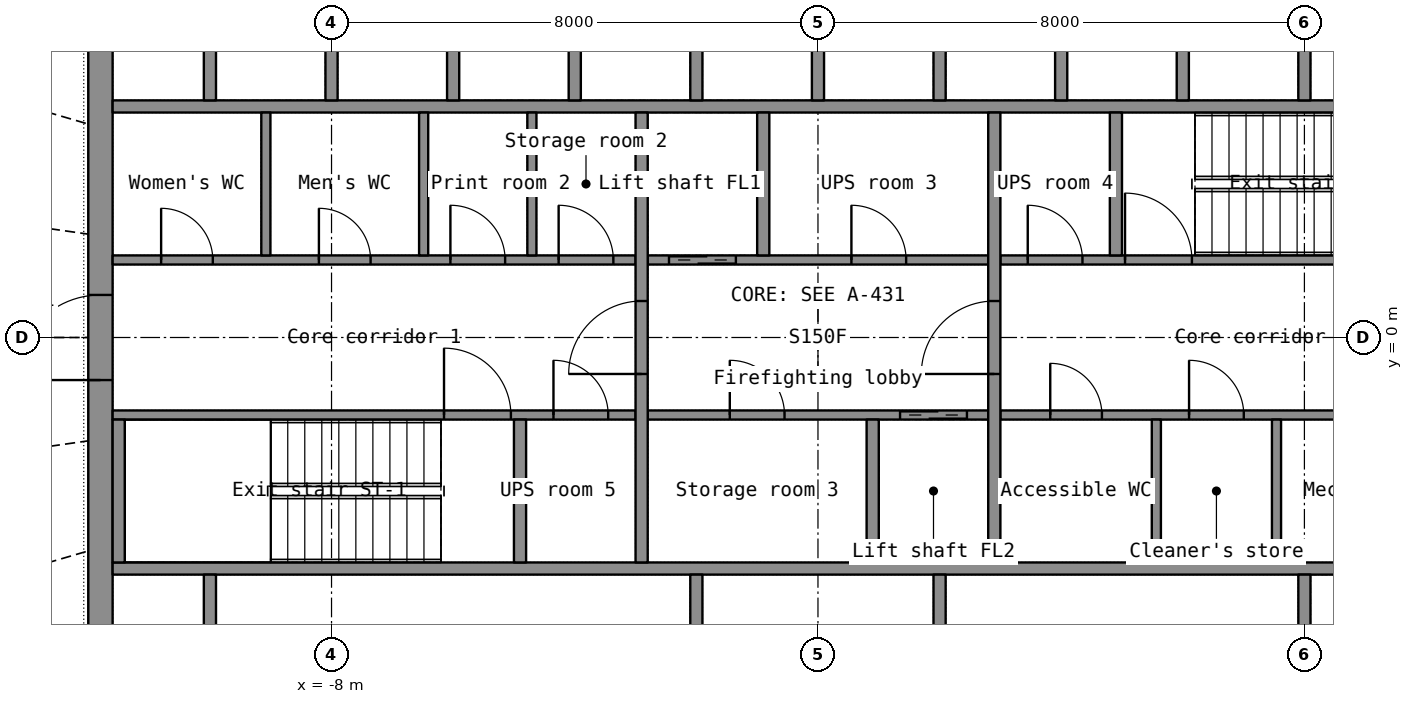
"""IFC4 building model, lengths in metres.
Left out: names, types, materials, properties, quantities, classifications, styles, units other than length and angle.
Written with IfcOpenShell. Run it as: python <this file> out.ifc"""

import sys

from ifc_helpers import new_model, si_unit, direction, frame, frame_2d, origin, place, context, subcontext, project, spatial, rectangle, extrude, element, fill, save


model = new_model("IFC4")
c1 = context("Model", 3, precision=1e-05, world=origin(), true_north=direction((0.0, 1.0)))
c2 = subcontext(c1, "Body", "Model", "MODEL_VIEW")
j1 = project(units=[si_unit("LENGTHUNIT", "METRE"), si_unit("PLANEANGLEUNIT", "RADIAN")], contexts=[c1])
p1 = place(None, origin())
s1 = spatial("IfcSite", under=j1, at=p1, CompositionType="ELEMENT")
p2 = place(p1, origin())
s2 = spatial("IfcBuilding", under=s1, at=p2, CompositionType="ELEMENT")
p3 = place(p2, frame((0.0, 0.0, 246.7)))
s3 = spatial("IfcBuildingStorey", under=s2, at=p3, CompositionType="ELEMENT", Elevation=246.7)
p4 = place(p3, frame((-11.8, -7.2, 0.0), z_axis=(0.0, 0.0, 1.0), x_axis=(0.0, 1.0, 0.0)))
e1 = element("IfcWall", 1, at=p4, inside=s3, PredefinedType="SHEAR", context=c2, shape_type="SweptSolid", body=[
    extrude(rectangle(XDim=14.4, YDim=0.4, at=frame_2d((7.2, 0.0))), origin(), (0.0, 0.0, 1.0), 3.3),
])
p5 = place(p4, frame((6.5, 0.0, 0.0)))
e2 = element("IfcOpeningElement", 2, at=p5, cuts=e1, PredefinedType="OPENING", context=c2, shape_type="SweptSolid", body=[
    extrude(rectangle(XDim=1.4, YDim=2.2, at=frame_2d((0.7, 1.1))), frame((0.0, 0.21, 0.0), z_axis=(0.0, -1.0, 0.0), x_axis=(1.0, 0.0, 0.0)), (0.0, 0.0, 1.0), 0.42),
])
for number, where, z_axis, x_axis in (
    (3, (-11.6, -3.8, 0.0), (0.0, 0.0, 1.0), (1.0, 0.0, 0.0)),
    (4, (-11.6, 3.8, 0.0), (0.0, 0.0, 1.0), (1.0, 0.0, 0.0)),
):
    element("IfcWall", number, at=place(p3, frame(where, z_axis=z_axis, x_axis=x_axis)), inside=s3, PredefinedType="SHEAR", context=c2, shape_type="SweptSolid", body=[
        extrude(rectangle(XDim=23.2, YDim=0.2, at=frame_2d((11.6, 0.0))), origin(), (0.0, 0.0, 1.0), 3.3),
    ])
for number, where, z_axis, x_axis in (
    (5, (-10.0, -6.8, 0.0), (0.0, 0.0, 1.0), (0.0, 1.0, 0.0)),
    (6, (8.0, -6.8, 0.0), (0.0, 0.0, 1.0), (0.0, 1.0, 0.0)),
):
    element("IfcWall", number, at=place(p3, frame(where, z_axis=z_axis, x_axis=x_axis)), inside=s3, PredefinedType="SHEAR", context=c2, shape_type="SweptSolid", body=[
        extrude(rectangle(XDim=2.9, YDim=0.2, at=frame_2d((1.45, 0.0))), origin(), (0.0, 0.0, 1.0), 3.3),
    ])
for number, where, z_axis, x_axis in (
    (7, (-2.0, -6.8, 0.0), (0.0, 0.0, 1.0), (0.0, 1.0, 0.0)),
    (8, (2.0, -6.8, 0.0), (0.0, 0.0, 1.0), (0.0, 1.0, 0.0)),
):
    element("IfcWall", number, at=place(p3, frame(where, z_axis=z_axis, x_axis=x_axis)), inside=s3, PredefinedType="PARTITIONING", context=c2, shape_type="SweptSolid", body=[
        extrude(rectangle(XDim=2.9, YDim=0.2, at=frame_2d((1.45, 0.0))), origin(), (0.0, 0.0, 1.0), 3.3),
    ])
for number, where, z_axis, x_axis in (
    (9, (-10.0, 3.9, 0.0), (0.0, 0.0, 1.0), (0.0, 1.0, 0.0)),
    (10, (-8.0, 3.9, 0.0), (0.0, 0.0, 1.0), (0.0, 1.0, 0.0)),
    (11, (-6.0, 3.9, 0.0), (0.0, 0.0, 1.0), (0.0, 1.0, 0.0)),
    (12, (-4.0, 3.9, 0.0), (0.0, 0.0, 1.0), (0.0, 1.0, 0.0)),
    (13, (-2.0, 3.9, 0.0), (0.0, 0.0, 1.0), (0.0, 1.0, 0.0)),
    (14, (0.0, 3.9, 0.0), (0.0, 0.0, 1.0), (0.0, 1.0, 0.0)),
    (15, (2.0, 3.9, 0.0), (0.0, 0.0, 1.0), (0.0, 1.0, 0.0)),
    (16, (4.0, 3.9, 0.0), (0.0, 0.0, 1.0), (0.0, 1.0, 0.0)),
    (17, (6.0, 3.9, 0.0), (0.0, 0.0, 1.0), (0.0, 1.0, 0.0)),
    (18, (8.0, 3.9, 0.0), (0.0, 0.0, 1.0), (0.0, 1.0, 0.0)),
):
    element("IfcWall", number, at=place(p3, frame(where, z_axis=z_axis, x_axis=x_axis)), inside=s3, PredefinedType="SHEAR", context=c2, shape_type="SweptSolid", body=[
        extrude(rectangle(XDim=2.9, YDim=0.2, at=frame_2d((1.45, 0.0))), origin(), (0.0, 0.0, 1.0), 3.3),
    ])
p6 = place(p3, frame((-11.6, -1.275, 0.0), z_axis=(0.0, 0.0, 1.0), x_axis=(1.0, 0.0, 0.0)))
e19 = element("IfcWall", 19, at=p6, inside=s3, PredefinedType="SHEAR", context=c2, shape_type="SweptSolid", body=[
    extrude(rectangle(XDim=8.6, YDim=0.15, at=frame_2d((4.3, 0.0))), origin(), (0.0, 0.0, 1.0), 3.3),
])
p7 = place(p6, frame((5.45, 0.0, 0.0)))
e20 = element("IfcOpeningElement", 20, at=p7, cuts=e19, PredefinedType="OPENING", context=c2, shape_type="SweptSolid", body=[
    extrude(rectangle(XDim=1.1, YDim=2.15, at=frame_2d((0.55, 1.075))), frame((0.0, 0.085, 0.0), z_axis=(0.0, -1.0, 0.0), x_axis=(1.0, 0.0, 0.0)), (0.0, 0.0, 1.0), 0.17),
])
p8 = place(p6, frame((7.25, 0.0, 0.0)))
e21 = element("IfcOpeningElement", 21, at=p8, cuts=e19, PredefinedType="OPENING", context=c2, shape_type="SweptSolid", body=[
    extrude(rectangle(XDim=0.9, YDim=2.1, at=frame_2d((0.45, 1.05))), frame((0.0, 0.085, 0.0), z_axis=(0.0, -1.0, 0.0), x_axis=(1.0, 0.0, 0.0)), (0.0, 0.0, 1.0), 0.17),
])
p9 = place(p3, frame((-2.8, -1.275, 0.0), z_axis=(0.0, 0.0, 1.0), x_axis=(1.0, 0.0, 0.0)))
e22 = element("IfcWall", 22, at=p9, inside=s3, PredefinedType="SHEAR", context=c2, shape_type="SweptSolid", body=[
    extrude(rectangle(XDim=5.6, YDim=0.15, at=frame_2d((2.8, 0.0))), origin(), (0.0, 0.0, 1.0), 3.3),
])
p10 = place(p9, frame((4.15, 0.0, 0.0)))
e23 = element("IfcOpeningElement", 23, at=p10, cuts=e22, PredefinedType="OPENING", context=c2, shape_type="SweptSolid", body=[
    extrude(rectangle(XDim=1.1, YDim=2.2, at=frame_2d((0.55, 1.1))), frame((0.0, 0.085, 0.0), z_axis=(0.0, -1.0, 0.0), x_axis=(1.0, 0.0, 0.0)), (0.0, 0.0, 1.0), 0.17),
])
p11 = place(p9, frame((1.35, 0.0, 0.0)))
e24 = element("IfcOpeningElement", 24, at=p11, cuts=e22, PredefinedType="OPENING", context=c2, shape_type="SweptSolid", body=[
    extrude(rectangle(XDim=0.9, YDim=2.1, at=frame_2d((0.45, 1.05))), frame((0.0, 0.085, 0.0), z_axis=(0.0, -1.0, 0.0), x_axis=(1.0, 0.0, 0.0)), (0.0, 0.0, 1.0), 0.17),
])
p12 = place(p3, frame((3.0, -1.275, 0.0), z_axis=(0.0, 0.0, 1.0), x_axis=(1.0, 0.0, 0.0)))
e25 = element("IfcWall", 25, at=p12, inside=s3, PredefinedType="PARTITIONING", context=c2, shape_type="SweptSolid", body=[
    extrude(rectangle(XDim=8.6, YDim=0.15, at=frame_2d((4.3, 0.0))), origin(), (0.0, 0.0, 1.0), 3.3),
])
p13 = place(p12, frame((0.82, 0.0, 0.0)))
e26 = element("IfcOpeningElement", 26, at=p13, cuts=e25, PredefinedType="OPENING", context=c2, shape_type="SweptSolid", body=[
    extrude(rectangle(XDim=0.85, YDim=2.1, at=frame_2d((0.425, 1.05))), frame((0.0, 0.085, 0.0), z_axis=(0.0, -1.0, 0.0), x_axis=(1.0, 0.0, 0.0)), (0.0, 0.0, 1.0), 0.17),
])
p14 = place(p12, frame((3.103, 0.0, 0.0)))
e27 = element("IfcOpeningElement", 27, at=p14, cuts=e25, PredefinedType="OPENING", context=c2, shape_type="SweptSolid", body=[
    extrude(rectangle(XDim=0.9, YDim=2.1, at=frame_2d((0.45, 1.05))), frame((0.0, 0.085, 0.0), z_axis=(0.0, -1.0, 0.0), x_axis=(1.0, 0.0, 0.0)), (0.0, 0.0, 1.0), 0.17),
])
p15 = place(p12, frame((6.158, 0.0, 0.0)))
e28 = element("IfcOpeningElement", 28, at=p15, cuts=e25, PredefinedType="OPENING", context=c2, shape_type="SweptSolid", body=[
    extrude(rectangle(XDim=0.9, YDim=2.1, at=frame_2d((0.45, 1.05))), frame((0.0, 0.085, 0.0), z_axis=(0.0, -1.0, 0.0), x_axis=(1.0, 0.0, 0.0)), (0.0, 0.0, 1.0), 0.17),
])
p16 = place(p3, frame((-11.6, 1.275, 0.0), z_axis=(0.0, 0.0, 1.0), x_axis=(1.0, 0.0, 0.0)))
e29 = element("IfcWall", 29, at=p16, inside=s3, PredefinedType="PARTITIONING", context=c2, shape_type="SweptSolid", body=[
    extrude(rectangle(XDim=8.6, YDim=0.15, at=frame_2d((4.3, 0.0))), origin(), (0.0, 0.0, 1.0), 3.3),
])
p17 = place(p16, frame((0.798, 0.0, 0.0)))
e30 = element("IfcOpeningElement", 30, at=p17, cuts=e29, PredefinedType="OPENING", context=c2, shape_type="SweptSolid", body=[
    extrude(rectangle(XDim=0.85, YDim=2.1, at=frame_2d((0.425, 1.05))), frame((0.0, 0.085, 0.0), z_axis=(0.0, -1.0, 0.0), x_axis=(1.0, 0.0, 0.0)), (0.0, 0.0, 1.0), 0.17),
])
p18 = place(p16, frame((3.393, 0.0, 0.0)))
e31 = element("IfcOpeningElement", 31, at=p18, cuts=e29, PredefinedType="OPENING", context=c2, shape_type="SweptSolid", body=[
    extrude(rectangle(XDim=0.85, YDim=2.1, at=frame_2d((0.425, 1.05))), frame((0.0, 0.085, 0.0), z_axis=(0.0, -1.0, 0.0), x_axis=(1.0, 0.0, 0.0)), (0.0, 0.0, 1.0), 0.17),
])
p19 = place(p16, frame((5.555, 0.0, 0.0)))
e32 = element("IfcOpeningElement", 32, at=p19, cuts=e29, PredefinedType="OPENING", context=c2, shape_type="SweptSolid", body=[
    extrude(rectangle(XDim=0.9, YDim=2.1, at=frame_2d((0.45, 1.05))), frame((0.0, 0.085, 0.0), z_axis=(0.0, -1.0, 0.0), x_axis=(1.0, 0.0, 0.0)), (0.0, 0.0, 1.0), 0.17),
])
p20 = place(p16, frame((7.335, 0.0, 0.0)))
e33 = element("IfcOpeningElement", 33, at=p20, cuts=e29, PredefinedType="OPENING", context=c2, shape_type="SweptSolid", body=[
    extrude(rectangle(XDim=0.9, YDim=2.1, at=frame_2d((0.45, 1.05))), frame((0.0, 0.085, 0.0), z_axis=(0.0, -1.0, 0.0), x_axis=(1.0, 0.0, 0.0)), (0.0, 0.0, 1.0), 0.17),
])
p21 = place(p3, frame((-2.8, 1.275, 0.0), z_axis=(0.0, 0.0, 1.0), x_axis=(1.0, 0.0, 0.0)))
e34 = element("IfcWall", 34, at=p21, inside=s3, PredefinedType="SHEAR", context=c2, shape_type="SweptSolid", body=[
    extrude(rectangle(XDim=5.6, YDim=0.15, at=frame_2d((2.8, 0.0))), origin(), (0.0, 0.0, 1.0), 3.3),
])
p22 = place(p21, frame((0.35, 0.0, 0.0)))
e35 = element("IfcOpeningElement", 35, at=p22, cuts=e34, PredefinedType="OPENING", context=c2, shape_type="SweptSolid", body=[
    extrude(rectangle(XDim=1.1, YDim=2.2, at=frame_2d((0.55, 1.1))), frame((0.0, 0.085, 0.0), z_axis=(0.0, -1.0, 0.0), x_axis=(1.0, 0.0, 0.0)), (0.0, 0.0, 1.0), 0.17),
])
p23 = place(p21, frame((3.35, 0.0, 0.0)))
e36 = element("IfcOpeningElement", 36, at=p23, cuts=e34, PredefinedType="OPENING", context=c2, shape_type="SweptSolid", body=[
    extrude(rectangle(XDim=0.9, YDim=2.1, at=frame_2d((0.45, 1.05))), frame((0.0, 0.085, 0.0), z_axis=(0.0, -1.0, 0.0), x_axis=(1.0, 0.0, 0.0)), (0.0, 0.0, 1.0), 0.17),
])
p24 = place(p3, frame((3.0, 1.275, 0.0), z_axis=(0.0, 0.0, 1.0), x_axis=(1.0, 0.0, 0.0)))
e37 = element("IfcWall", 37, at=p24, inside=s3, PredefinedType="SHEAR", context=c2, shape_type="SweptSolid", body=[
    extrude(rectangle(XDim=8.6, YDim=0.15, at=frame_2d((4.3, 0.0))), origin(), (0.0, 0.0, 1.0), 3.3),
])
p25 = place(p24, frame((2.05, 0.0, 0.0)))
e38 = element("IfcOpeningElement", 38, at=p25, cuts=e37, PredefinedType="OPENING", context=c2, shape_type="SweptSolid", body=[
    extrude(rectangle(XDim=1.1, YDim=2.15, at=frame_2d((0.55, 1.075))), frame((0.0, 0.085, 0.0), z_axis=(0.0, -1.0, 0.0), x_axis=(1.0, 0.0, 0.0)), (0.0, 0.0, 1.0), 0.17),
])
p26 = place(p24, frame((0.45, 0.0, 0.0)))
e39 = element("IfcOpeningElement", 39, at=p26, cuts=e37, PredefinedType="OPENING", context=c2, shape_type="SweptSolid", body=[
    extrude(rectangle(XDim=0.9, YDim=2.1, at=frame_2d((0.45, 1.05))), frame((0.0, 0.085, 0.0), z_axis=(0.0, -1.0, 0.0), x_axis=(1.0, 0.0, 0.0)), (0.0, 0.0, 1.0), 0.17),
])
p27 = place(p3, frame((-2.9, -3.7, 0.0), z_axis=(0.0, 0.0, 1.0), x_axis=(0.0, 1.0, 0.0)))
e40 = element("IfcWall", 40, at=p27, inside=s3, PredefinedType="SHEAR", context=c2, shape_type="SweptSolid", body=[
    extrude(rectangle(XDim=7.4, YDim=0.2, at=frame_2d((3.7, 0.0))), origin(), (0.0, 0.0, 1.0), 3.3),
])
p28 = place(p27, frame((3.1, 0.0, 0.0)))
e41 = element("IfcOpeningElement", 41, at=p28, cuts=e40, PredefinedType="OPENING", context=c2, shape_type="SweptSolid", body=[
    extrude(rectangle(XDim=1.2, YDim=2.2, at=frame_2d((0.6, 1.1))), frame((0.0, 0.11, 0.0), z_axis=(0.0, -1.0, 0.0), x_axis=(1.0, 0.0, 0.0)), (0.0, 0.0, 1.0), 0.22),
])
p29 = place(p3, frame((2.9, -3.7, 0.0), z_axis=(0.0, 0.0, 1.0), x_axis=(0.0, 1.0, 0.0)))
e42 = element("IfcWall", 42, at=p29, inside=s3, PredefinedType="SHEAR", context=c2, shape_type="SweptSolid", body=[
    extrude(rectangle(XDim=7.4, YDim=0.2, at=frame_2d((3.7, 0.0))), origin(), (0.0, 0.0, 1.0), 3.3),
])
p30 = place(p29, frame((3.1, 0.0, 0.0)))
e43 = element("IfcOpeningElement", 43, at=p30, cuts=e42, PredefinedType="OPENING", context=c2, shape_type="SweptSolid", body=[
    extrude(rectangle(XDim=1.2, YDim=2.2, at=frame_2d((0.6, 1.1))), frame((0.0, 0.11, 0.0), z_axis=(0.0, -1.0, 0.0), x_axis=(1.0, 0.0, 0.0)), (0.0, 0.0, 1.0), 0.22),
])
for number, where, z_axis, x_axis in (
    (44, (-0.9, 1.35, 0.0), (0.0, 0.0, 1.0), (0.0, 1.0, 0.0)),
    (45, (0.9, -3.7, 0.0), (0.0, 0.0, 1.0), (0.0, 1.0, 0.0)),
    (46, (-11.5, -3.7, 0.0), (0.0, 0.0, 1.0), (0.0, 1.0, 0.0)),
    (47, (-4.9, -3.7, 0.0), (0.0, 0.0, 1.0), (0.0, 1.0, 0.0)),
    (48, (4.9, 1.35, 0.0), (0.0, 0.0, 1.0), (0.0, 1.0, 0.0)),
):
    element("IfcWall", number, at=place(p3, frame(where, z_axis=z_axis, x_axis=x_axis)), inside=s3, PredefinedType="SHEAR", context=c2, shape_type="SweptSolid", body=[
        extrude(rectangle(XDim=2.35, YDim=0.2, at=frame_2d((1.175, 0.0))), origin(), (0.0, 0.0, 1.0), 3.3),
    ])
for number, where, z_axis, x_axis in (
    (49, (-9.08, 1.35, 0.0), (0.0, 0.0, 1.0), (0.0, 1.0, 0.0)),
    (50, (-6.485, 1.35, 0.0), (0.0, 0.0, 1.0), (0.0, 1.0, 0.0)),
    (51, (-4.705, 1.35, 0.0), (0.0, 0.0, 1.0), (0.0, 1.0, 0.0)),
    (52, (5.565, -3.7, 0.0), (0.0, 0.0, 1.0), (0.0, 1.0, 0.0)),
    (53, (7.541, -3.7, 0.0), (0.0, 0.0, 1.0), (0.0, 1.0, 0.0)),
):
    element("IfcWall", number, at=place(p3, frame(where, z_axis=z_axis, x_axis=x_axis)), inside=s3, PredefinedType="PARTITIONING", context=c2, shape_type="SweptSolid", body=[
        extrude(rectangle(XDim=2.35, YDim=0.15, at=frame_2d((1.175, 0.0))), origin(), (0.0, 0.0, 1.0), 3.3),
    ])
p31 = place(p5, origin())
e54 = element("IfcDoor", 54, at=p31, inside=s3, OperationType="DOUBLE_DOOR_SINGLE_SWING", PredefinedType="DOOR", context=c2, shape_type="SweptSolid", body=[
    extrude(rectangle(XDim=1.4, YDim=2.2, at=frame_2d((0.7, 1.1))), frame((0.0, 0.025, 0.0), z_axis=(0.0, -1.0, 0.0), x_axis=(1.0, 0.0, 0.0)), (0.0, 0.0, 1.0), 0.05),
])
fill(e2, e54)
p32 = place(p28, origin())
e55 = element("IfcDoor", 55, at=p32, inside=s3, OperationType="SINGLE_SWING_LEFT", PredefinedType="DOOR", context=c2, shape_type="SweptSolid", body=[
    extrude(rectangle(XDim=1.2, YDim=2.2, at=frame_2d((0.6, 1.1))), frame((0.0, 0.025, 0.0), z_axis=(0.0, -1.0, 0.0), x_axis=(1.0, 0.0, 0.0)), (0.0, 0.0, 1.0), 0.05),
])
fill(e41, e55)
p33 = place(p30, origin())
e56 = element("IfcDoor", 56, at=p33, inside=s3, OperationType="SINGLE_SWING_LEFT", PredefinedType="DOOR", context=c2, shape_type="SweptSolid", body=[
    extrude(rectangle(XDim=1.2, YDim=2.2, at=frame_2d((0.6, 1.1))), frame((0.0, 0.025, 0.0), z_axis=(0.0, -1.0, 0.0), x_axis=(1.0, 0.0, 0.0)), (0.0, 0.0, 1.0), 0.05),
])
fill(e43, e56)
p34 = place(p22, origin())
e57 = element("IfcDoor", 57, at=p34, inside=s3, OperationType="DOUBLE_DOOR_SLIDING", PredefinedType="DOOR", context=c2, shape_type="SweptSolid", body=[
    extrude(rectangle(XDim=1.1, YDim=2.2, at=frame_2d((0.55, 1.1))), frame((0.0, 0.025, 0.0), z_axis=(0.0, -1.0, 0.0), x_axis=(1.0, 0.0, 0.0)), (0.0, 0.0, 1.0), 0.05),
])
fill(e35, e57)
p35 = place(p10, origin())
e58 = element("IfcDoor", 58, at=p35, inside=s3, OperationType="DOUBLE_DOOR_SLIDING", PredefinedType="DOOR", context=c2, shape_type="SweptSolid", body=[
    extrude(rectangle(XDim=1.1, YDim=2.2, at=frame_2d((0.55, 1.1))), frame((0.0, 0.025, 0.0), z_axis=(0.0, -1.0, 0.0), x_axis=(1.0, 0.0, 0.0)), (0.0, 0.0, 1.0), 0.05),
])
fill(e23, e58)
p36 = place(p7, origin())
e59 = element("IfcDoor", 59, at=p36, inside=s3, OperationType="SINGLE_SWING_LEFT", PredefinedType="DOOR", context=c2, shape_type="SweptSolid", body=[
    extrude(rectangle(XDim=1.1, YDim=2.15, at=frame_2d((0.55, 1.075))), frame((0.0, 0.025, 0.0), z_axis=(0.0, -1.0, 0.0), x_axis=(1.0, 0.0, 0.0)), (0.0, 0.0, 1.0), 0.05),
])
fill(e20, e59)
p37 = place(p25, origin())
e60 = element("IfcDoor", 60, at=p37, inside=s3, OperationType="SINGLE_SWING_LEFT", PredefinedType="DOOR", context=c2, shape_type="SweptSolid", body=[
    extrude(rectangle(XDim=1.1, YDim=2.15, at=frame_2d((0.55, 1.075))), frame((0.0, 0.025, 0.0), z_axis=(0.0, -1.0, 0.0), x_axis=(1.0, 0.0, 0.0)), (0.0, 0.0, 1.0), 0.05),
])
fill(e38, e60)
p38 = place(p17, origin())
e61 = element("IfcDoor", 61, at=p38, inside=s3, OperationType="SINGLE_SWING_LEFT", PredefinedType="DOOR", context=c2, shape_type="SweptSolid", body=[
    extrude(rectangle(XDim=0.85, YDim=2.1, at=frame_2d((0.425, 1.05))), frame((0.0, 0.025, 0.0), z_axis=(0.0, -1.0, 0.0), x_axis=(1.0, 0.0, 0.0)), (0.0, 0.0, 1.0), 0.05),
])
fill(e30, e61)
p39 = place(p18, origin())
e62 = element("IfcDoor", 62, at=p39, inside=s3, OperationType="SINGLE_SWING_LEFT", PredefinedType="DOOR", context=c2, shape_type="SweptSolid", body=[
    extrude(rectangle(XDim=0.85, YDim=2.1, at=frame_2d((0.425, 1.05))), frame((0.0, 0.025, 0.0), z_axis=(0.0, -1.0, 0.0), x_axis=(1.0, 0.0, 0.0)), (0.0, 0.0, 1.0), 0.05),
])
fill(e31, e62)
p40 = place(p19, origin())
e63 = element("IfcDoor", 63, at=p40, inside=s3, OperationType="SINGLE_SWING_LEFT", PredefinedType="DOOR", context=c2, shape_type="SweptSolid", body=[
    extrude(rectangle(XDim=0.9, YDim=2.1, at=frame_2d((0.45, 1.05))), frame((0.0, 0.025, 0.0), z_axis=(0.0, -1.0, 0.0), x_axis=(1.0, 0.0, 0.0)), (0.0, 0.0, 1.0), 0.05),
])
fill(e32, e63)
p41 = place(p20, origin())
e64 = element("IfcDoor", 64, at=p41, inside=s3, OperationType="SINGLE_SWING_LEFT", PredefinedType="DOOR", context=c2, shape_type="SweptSolid", body=[
    extrude(rectangle(XDim=0.9, YDim=2.1, at=frame_2d((0.45, 1.05))), frame((0.0, 0.025, 0.0), z_axis=(0.0, -1.0, 0.0), x_axis=(1.0, 0.0, 0.0)), (0.0, 0.0, 1.0), 0.05),
])
fill(e33, e64)
p42 = place(p13, origin())
e65 = element("IfcDoor", 65, at=p42, inside=s3, OperationType="SINGLE_SWING_LEFT", PredefinedType="DOOR", context=c2, shape_type="SweptSolid", body=[
    extrude(rectangle(XDim=0.85, YDim=2.1, at=frame_2d((0.425, 1.05))), frame((0.0, 0.025, 0.0), z_axis=(0.0, -1.0, 0.0), x_axis=(1.0, 0.0, 0.0)), (0.0, 0.0, 1.0), 0.05),
])
fill(e26, e65)
p43 = place(p14, origin())
e66 = element("IfcDoor", 66, at=p43, inside=s3, OperationType="SINGLE_SWING_LEFT", PredefinedType="DOOR", context=c2, shape_type="SweptSolid", body=[
    extrude(rectangle(XDim=0.9, YDim=2.1, at=frame_2d((0.45, 1.05))), frame((0.0, 0.025, 0.0), z_axis=(0.0, -1.0, 0.0), x_axis=(1.0, 0.0, 0.0)), (0.0, 0.0, 1.0), 0.05),
])
fill(e27, e66)
p44 = place(p23, origin())
e67 = element("IfcDoor", 67, at=p44, inside=s3, OperationType="SINGLE_SWING_LEFT", PredefinedType="DOOR", context=c2, shape_type="SweptSolid", body=[
    extrude(rectangle(XDim=0.9, YDim=2.1, at=frame_2d((0.45, 1.05))), frame((0.0, 0.025, 0.0), z_axis=(0.0, -1.0, 0.0), x_axis=(1.0, 0.0, 0.0)), (0.0, 0.0, 1.0), 0.05),
])
fill(e36, e67)
p45 = place(p11, origin())
e68 = element("IfcDoor", 68, at=p45, inside=s3, OperationType="SINGLE_SWING_LEFT", PredefinedType="DOOR", context=c2, shape_type="SweptSolid", body=[
    extrude(rectangle(XDim=0.9, YDim=2.1, at=frame_2d((0.45, 1.05))), frame((0.0, 0.025, 0.0), z_axis=(0.0, -1.0, 0.0), x_axis=(1.0, 0.0, 0.0)), (0.0, 0.0, 1.0), 0.05),
])
fill(e24, e68)
p46 = place(p26, origin())
e69 = element("IfcDoor", 69, at=p46, inside=s3, OperationType="SINGLE_SWING_LEFT", PredefinedType="DOOR", context=c2, shape_type="SweptSolid", body=[
    extrude(rectangle(XDim=0.9, YDim=2.1, at=frame_2d((0.45, 1.05))), frame((0.0, 0.025, 0.0), z_axis=(0.0, -1.0, 0.0), x_axis=(1.0, 0.0, 0.0)), (0.0, 0.0, 1.0), 0.05),
])
fill(e39, e69)
p47 = place(p8, origin())
e70 = element("IfcDoor", 70, at=p47, inside=s3, OperationType="SINGLE_SWING_LEFT", PredefinedType="DOOR", context=c2, shape_type="SweptSolid", body=[
    extrude(rectangle(XDim=0.9, YDim=2.1, at=frame_2d((0.45, 1.05))), frame((0.0, 0.025, 0.0), z_axis=(0.0, -1.0, 0.0), x_axis=(1.0, 0.0, 0.0)), (0.0, 0.0, 1.0), 0.05),
])
fill(e21, e70)
save(model, sys.argv[1])
